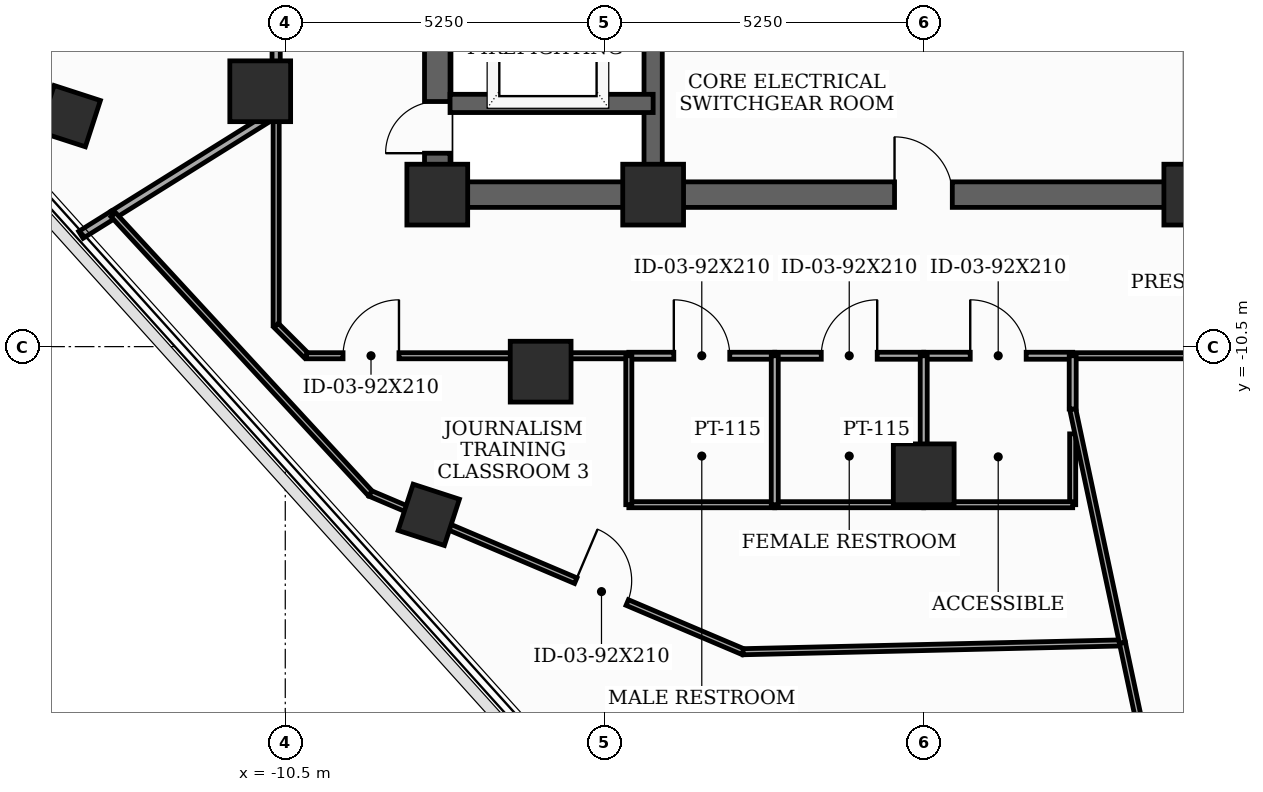
"""IFC4 building model, lengths in metres.
Left out: names, types, materials, properties, quantities, classifications, styles, units other than length and angle.
Written with IfcOpenShell. Run it as: python <this file> out.ifc"""

import sys

from ifc_helpers import new_model, si_unit, direction, frame, frame_2d, origin, origin_2d, place, context, subcontext, project, spatial, rectangle, extrude, element, fill, save


model = new_model("IFC4")
c1 = context("Model", 3, precision=1e-05, world=origin(), true_north=direction((0.0, 1.0)))
c2 = subcontext(c1, "Body", "Model", "MODEL_VIEW")
j1 = project(units=[si_unit("LENGTHUNIT", "METRE"), si_unit("PLANEANGLEUNIT", "RADIAN")], contexts=[c1])
p1 = place(None, origin())
s1 = spatial("IfcSite", under=j1, at=p1, CompositionType="ELEMENT")
p2 = place(p1, origin())
s2 = spatial("IfcBuilding", under=s1, at=p2, CompositionType="ELEMENT")
p3 = place(p2, frame((0.0, 0.0, 283.2)))
s3 = spatial("IfcBuildingStorey", under=s2, at=p3, CompositionType="ELEMENT", Elevation=283.2)
for number, where, z_axis, x_axis in (
    (1, (-8.0, -8.0, 0.0), (0.0, 0.0, 1.0), (1.0, 0.0, 0.0)),
    (2, (-4.45, -8.0, 0.0), (0.0, 0.0, 1.0), (1.0, 0.0, 0.0)),
    (3, (4.45, -8.0, 0.0), (0.0, 0.0, 1.0), (1.0, 0.0, 0.0)),
    (4, (-10.912, -6.3, 0.0), (0.0, 0.0, 1.0), (1.0, 0.0, 0.0)),
    (5, (-6.3, -10.912, 0.0), (0.0, 0.0, 1.0), (1.0, 0.0, 0.0)),
    (6, (0.0, -12.6, 0.0), (0.0, 0.0, 1.0), (1.0, 0.0, 0.0)),
):
    element("IfcColumn", number, at=place(p3, frame(where, z_axis=z_axis, x_axis=x_axis)), inside=s3, PredefinedType="COLUMN", context=c2, shape_type="SweptSolid", body=[
        extrude(rectangle(XDim=1.0, YDim=1.0, at=origin_2d()), origin(), (0.0, 0.0, 1.0), 3.7),
    ])
for number, where, z_axis, x_axis in (
    (7, (-14.045, -6.709, 0.0), (0.0, 0.0, 1.0), (0.309, 0.951, 0.0)),
    (8, (-8.14, -13.266, 0.0), (0.0, 0.0, 1.0), (0.309, 0.951, 0.0)),
):
    element("IfcColumn", number, at=place(p3, frame(where, z_axis=z_axis, x_axis=x_axis)), inside=s3, PredefinedType="COLUMN", context=c2, shape_type="SweptSolid", body=[
        extrude(rectangle(XDim=0.8, YDim=0.8, at=origin_2d()), origin(), (0.0, 0.0, 1.0), 3.7),
    ])
p4 = place(p3, frame((-8.0, -8.0, 0.0), z_axis=(0.0, 0.0, 1.0), x_axis=(0.0, 1.0, 0.0)))
e9 = element("IfcWall", 9, at=p4, inside=s3, PredefinedType="SHEAR", context=c2, shape_type="SweptSolid", body=[
    extrude(rectangle(XDim=16.0, YDim=0.42, at=frame_2d((8.0, 0.0))), origin(), (0.0, 0.0, 1.0), 3.5),
])
p5 = place(p4, frame((0.681, 0.0, 0.0)))
e10 = element("IfcOpeningElement", 10, at=p5, cuts=e9, PredefinedType="OPENING", context=c2, shape_type="SweptSolid", body=[
    extrude(rectangle(XDim=0.85, YDim=2.02, at=frame_2d((0.425, 1.01))), frame((0.0, 0.22, 0.0), z_axis=(0.0, -1.0, 0.0), x_axis=(1.0, 0.0, 0.0)), (0.0, 0.0, 1.0), 0.44),
])
p6 = place(p4, frame((5.35, 0.0, 0.0)))
e11 = element("IfcOpeningElement", 11, at=p6, cuts=e9, PredefinedType="OPENING", context=c2, shape_type="SweptSolid", body=[
    extrude(rectangle(XDim=1.05, YDim=2.15, at=frame_2d((0.525, 1.075))), frame((0.0, 0.22, 0.0), z_axis=(0.0, -1.0, 0.0), x_axis=(1.0, 0.0, 0.0)), (0.0, 0.0, 1.0), 0.44),
])
p7 = place(p3, frame((-8.0, -8.0, 0.0), z_axis=(0.0, 0.0, 1.0), x_axis=(1.0, 0.0, 0.0)))
e12 = element("IfcWall", 12, at=p7, inside=s3, PredefinedType="SHEAR", context=c2, shape_type="SweptSolid", body=[
    extrude(rectangle(XDim=16.0, YDim=0.42, at=frame_2d((8.0, 0.0))), origin(), (0.0, 0.0, 1.0), 3.5),
])
p8 = place(p7, frame((7.52, 0.0, 0.0)))
e13 = element("IfcOpeningElement", 13, at=p8, cuts=e12, PredefinedType="OPENING", context=c2, shape_type="SweptSolid", body=[
    extrude(rectangle(XDim=0.95, YDim=2.1, at=frame_2d((0.475, 1.05))), frame((0.0, 0.22, 0.0), z_axis=(0.0, -1.0, 0.0), x_axis=(1.0, 0.0, 0.0)), (0.0, 0.0, 1.0), 0.44),
])
p9 = place(p3, frame((-4.45, -7.79, 0.0), z_axis=(0.0, 0.0, 1.0), x_axis=(0.0, 1.0, 0.0)))
e14 = element("IfcWall", 14, at=p9, inside=s3, PredefinedType="SHEAR", context=c2, shape_type="SweptSolid", body=[
    extrude(rectangle(XDim=15.58, YDim=0.3, at=frame_2d((7.79, 0.0))), origin(), (0.0, 0.0, 1.0), 3.5),
])
p10 = place(p3, frame((-7.79, -6.5, 0.0), z_axis=(0.0, 0.0, 1.0), x_axis=(1.0, 0.0, 0.0)))
e15 = element("IfcWall", 15, at=p10, inside=s3, PredefinedType="SHEAR", context=c2, shape_type="SweptSolid", body=[
    extrude(rectangle(XDim=3.34, YDim=0.3, at=frame_2d((1.67, 0.0))), origin(), (0.0, 0.0, 1.0), 3.5),
])
p11 = place(p3, frame((-10.65, -4.225, 0.0), z_axis=(0.0, 0.0, 1.0), x_axis=(0.0, -1.0, 0.0)))
e16 = element("IfcWall", 16, at=p11, inside=s3, PredefinedType="PARTITIONING", context=c2, shape_type="SweptSolid", body=[
    extrude(rectangle(XDim=2.43, YDim=0.135, at=frame_2d((1.215, 0.0))), origin(), (0.0, 0.0, 1.0), 2.885),
])
p12 = place(p3, frame((-10.65, -6.655, 0.0), z_axis=(0.0, 0.0, 1.0), x_axis=(0.0, -1.0, 0.0)))
e17 = element("IfcWall", 17, at=p12, inside=s3, PredefinedType="MOVABLE", context=c2, shape_type="SweptSolid", body=[
    extrude(rectangle(XDim=3.495, YDim=0.1, at=frame_2d((1.748, 0.0))), origin(), (0.0, 0.0, 1.0), 2.885),
])
p13 = place(p3, frame((-10.65, -10.15, 0.0), z_axis=(0.0, 0.0, 1.0), x_axis=(0.707106781187, -0.707106781187, 0.0)))
e18 = element("IfcWall", 18, at=p13, inside=s3, PredefinedType="MOVABLE", context=c2, shape_type="SweptSolid", body=[
    extrude(rectangle(XDim=0.707, YDim=0.1, at=frame_2d((0.354, 0.0))), origin(), (0.0, 0.0, 1.0), 3.035),
])
p14 = place(p3, frame((-10.15, -10.65, 0.0), z_axis=(0.0, 0.0, 1.0), x_axis=(1.0, 0.0, 0.0)))
e19 = element("IfcWall", 19, at=p14, inside=s3, PredefinedType="MOVABLE", context=c2, shape_type="SweptSolid", body=[
    extrude(rectangle(XDim=5.3, YDim=0.1, at=frame_2d((2.65, 0.0))), origin(), (0.0, 0.0, 1.0), 2.885),
])
p15 = place(p14, frame((0.6, 0.0, 0.0)))
e20 = element("IfcOpeningElement", 20, at=p15, cuts=e19, PredefinedType="OPENING", context=c2, shape_type="SweptSolid", body=[
    extrude(rectangle(XDim=0.92, YDim=2.1, at=frame_2d((0.46, 1.05))), frame((0.0, 0.06, 0.0), z_axis=(0.0, -1.0, 0.0), x_axis=(1.0, 0.0, 0.0)), (0.0, 0.0, 1.0), 0.12),
])
p16 = place(p3, frame((-4.85, -10.65, 0.0), z_axis=(0.0, 0.0, 1.0), x_axis=(1.0, 0.0, 0.0)))
e21 = element("IfcWall", 21, at=p16, inside=s3, PredefinedType="PARTITIONING", context=c2, shape_type="SweptSolid", body=[
    extrude(rectangle(XDim=2.4, YDim=0.115, at=frame_2d((1.2, 0.0))), origin(), (0.0, 0.0, 1.0), 3.5),
])
p17 = place(p16, frame((0.74, 0.0, 0.0)))
e22 = element("IfcOpeningElement", 22, at=p17, cuts=e21, PredefinedType="OPENING", context=c2, shape_type="SweptSolid", body=[
    extrude(rectangle(XDim=0.92, YDim=2.1, at=frame_2d((0.46, 1.05))), frame((0.0, 0.067, 0.0), z_axis=(0.0, -1.0, 0.0), x_axis=(1.0, 0.0, 0.0)), (0.0, 0.0, 1.0), 0.135),
])
p18 = place(p3, frame((-2.45, -10.65, 0.0), z_axis=(0.0, 0.0, 1.0), x_axis=(1.0, 0.0, 0.0)))
e23 = element("IfcWall", 23, at=p18, inside=s3, PredefinedType="PARTITIONING", context=c2, shape_type="SweptSolid", body=[
    extrude(rectangle(XDim=2.45, YDim=0.115, at=frame_2d((1.225, 0.0))), origin(), (0.0, 0.0, 1.0), 2.885),
])
p19 = place(p18, frame((0.765, 0.0, 0.0)))
e24 = element("IfcOpeningElement", 24, at=p19, cuts=e23, PredefinedType="OPENING", context=c2, shape_type="SweptSolid", body=[
    extrude(rectangle(XDim=0.92, YDim=2.1, at=frame_2d((0.46, 1.05))), frame((0.0, 0.067, 0.0), z_axis=(0.0, -1.0, 0.0), x_axis=(1.0, 0.0, 0.0)), (0.0, 0.0, 1.0), 0.135),
])
p20 = place(p3, frame((0.0, -10.65, 0.0), z_axis=(0.0, 0.0, 1.0), x_axis=(1.0, 0.0, 0.0)))
e25 = element("IfcWall", 25, at=p20, inside=s3, PredefinedType="PARTITIONING", context=c2, shape_type="SweptSolid", body=[
    extrude(rectangle(XDim=2.45, YDim=0.115, at=frame_2d((1.225, 0.0))), origin(), (0.0, 0.0, 1.0), 3.5),
])
p21 = place(p20, frame((0.765, 0.0, 0.0)))
e26 = element("IfcOpeningElement", 26, at=p21, cuts=e25, PredefinedType="OPENING", context=c2, shape_type="SweptSolid", body=[
    extrude(rectangle(XDim=0.92, YDim=2.1, at=frame_2d((0.46, 1.05))), frame((0.0, 0.067, 0.0), z_axis=(0.0, -1.0, 0.0), x_axis=(1.0, 0.0, 0.0)), (0.0, 0.0, 1.0), 0.135),
])
p22 = place(p3, frame((2.45, -10.65, 0.0), z_axis=(0.0, 0.0, 1.0), x_axis=(1.0, 0.0, 0.0)))
e27 = element("IfcWall", 27, at=p22, inside=s3, PredefinedType="MOVABLE", context=c2, shape_type="SweptSolid", body=[
    extrude(rectangle(XDim=7.139, YDim=0.1, at=frame_2d((3.57, 0.0))), origin(), (0.0, 0.0, 1.0), 2.885),
])
p23 = place(p3, frame((-13.329, -8.329, 0.0), z_axis=(0.0, 0.0, 1.0), x_axis=(0.848059079617, 0.529901686617, 0.0)))
e28 = element("IfcWall", 28, at=p23, inside=s3, PredefinedType="PARTITIONING", context=c2, shape_type="SweptSolid", body=[
    extrude(rectangle(XDim=3.159, YDim=0.135, at=frame_2d((1.58, 0.0))), origin(), (0.0, 0.0, 1.0), 2.885),
])
p24 = place(p3, frame((-13.861, -8.661, 0.0), z_axis=(0.0, 0.0, 1.0), x_axis=(0.848151340075, 0.529754003599, 0.0)))
e29 = element("IfcWall", 29, at=p24, inside=s3, PredefinedType="PARTITIONING", context=c2, shape_type="SweptSolid", body=[
    extrude(rectangle(XDim=0.627, YDim=0.135, at=frame_2d((0.313, 0.0))), origin(), (0.0, 0.0, 1.0), 3.5),
])
p25 = place(p3, frame((-2.45, -13.1, 0.0), z_axis=(0.0, 0.0, 1.0), x_axis=(-1.0, 0.0, 0.0)))
e30 = element("IfcWall", 30, at=p25, inside=s3, PredefinedType="MOVABLE", context=c2, shape_type="SweptSolid", body=[
    extrude(rectangle(XDim=2.4, YDim=0.1, at=frame_2d((1.2, 0.0))), origin(), (0.0, 0.0, 1.0), 3.5),
])
p26 = place(p3, frame((-4.85, -13.1, 0.0), z_axis=(0.0, 0.0, 1.0), x_axis=(0.0, 1.0, 0.0)))
e31 = element("IfcWall", 31, at=p26, inside=s3, PredefinedType="MOVABLE", context=c2, shape_type="SweptSolid", body=[
    extrude(rectangle(XDim=2.45, YDim=0.1, at=frame_2d((1.225, 0.0))), origin(), (0.0, 0.0, 1.0), 2.885),
])
p27 = place(p3, frame((0.0, -13.1, 0.0), z_axis=(0.0, 0.0, 1.0), x_axis=(-1.0, 0.0, 0.0)))
e32 = element("IfcWall", 32, at=p27, inside=s3, PredefinedType="MOVABLE", context=c2, shape_type="SweptSolid", body=[
    extrude(rectangle(XDim=2.45, YDim=0.1, at=frame_2d((1.225, 0.0))), origin(), (0.0, 0.0, 1.0), 3.035),
])
p28 = place(p3, frame((-13.329, -8.329, 0.0), z_axis=(0.0, 0.0, 1.0), x_axis=(0.677841155448, -0.735208384052, 0.0)))
e33 = element("IfcWall", 33, at=p28, inside=s3, PredefinedType="MOVABLE", context=c2, shape_type="SweptSolid", body=[
    extrude(rectangle(XDim=6.239, YDim=0.1, at=frame_2d((3.12, 0.0))), origin(), (0.0, 0.0, 1.0), 3.5),
])
p29 = place(p3, frame((-9.1, -12.916, 0.0), z_axis=(0.0, 0.0, 1.0), x_axis=(0.920506675175, -0.390726836752, 0.0)))
e34 = element("IfcWall", 34, at=p29, inside=s3, PredefinedType="MOVABLE", context=c2, shape_type="SweptSolid", body=[
    extrude(rectangle(XDim=6.659, YDim=0.1, at=frame_2d((3.33, 0.0))), origin(), (0.0, 0.0, 1.0), 3.035),
])
p30 = place(p29, frame((3.669, 0.0, 0.0)))
e35 = element("IfcOpeningElement", 35, at=p30, cuts=e34, PredefinedType="OPENING", context=c2, shape_type="SweptSolid", body=[
    extrude(rectangle(XDim=0.92, YDim=2.1, at=frame_2d((0.46, 1.05))), frame((0.0, 0.06, 0.0), z_axis=(0.0, -1.0, 0.0), x_axis=(1.0, 0.0, 0.0)), (0.0, 0.0, 1.0), 0.12),
])
p31 = place(p3, frame((-2.97, -15.518, 0.0), z_axis=(0.0, 0.0, 1.0), x_axis=(0.99972988351, 0.023241342836, 0.0)))
e36 = element("IfcWall", 36, at=p31, inside=s3, PredefinedType="MOVABLE", context=c2, shape_type="SweptSolid", body=[
    extrude(rectangle(XDim=6.24, YDim=0.1, at=frame_2d((3.12, 0.0))), origin(), (0.0, 0.0, 1.0), 3.035),
])
p32 = place(p3, frame((2.45, -11.935, 0.0), z_axis=(0.0, 0.0, 1.0), x_axis=(0.0, -1.0, 0.0)))
e37 = element("IfcWall", 37, at=p32, inside=s3, PredefinedType="MOVABLE", context=c2, shape_type="SweptSolid", body=[
    extrude(rectangle(XDim=1.166, YDim=0.1, at=frame_2d((0.583, 0.0))), origin(), (0.0, 0.0, 1.0), 2.885),
])
p33 = place(p3, frame((2.45, -13.1, 0.0), z_axis=(0.0, 0.0, 1.0), x_axis=(-1.0, 0.0, 0.0)))
e38 = element("IfcWall", 38, at=p33, inside=s3, PredefinedType="MOVABLE", context=c2, shape_type="SweptSolid", body=[
    extrude(rectangle(XDim=2.45, YDim=0.1, at=frame_2d((1.225, 0.0))), origin(), (0.0, 0.0, 1.0), 3.035),
])
p34 = place(p3, frame((3.268, -15.373, 0.0), z_axis=(0.0, 0.0, 1.0), x_axis=(-0.208002774368, 0.978128235895, 0.0)))
e39 = element("IfcWall", 39, at=p34, inside=s3, PredefinedType="MOVABLE", context=c2, shape_type="SweptSolid", body=[
    extrude(rectangle(XDim=3.933, YDim=0.1, at=frame_2d((1.967, 0.0))), origin(), (0.0, 0.0, 1.0), 2.885),
])
for number, where, z_axis, x_axis in (
    (40, (-2.45, -13.1, 0.0), (0.0, 0.0, 1.0), (0.0, 1.0, 0.0)),
    (41, (0.0, -13.1, 0.0), (0.0, 0.0, 1.0), (0.0, 1.0, 0.0)),
):
    element("IfcWall", number, at=place(p3, frame(where, z_axis=z_axis, x_axis=x_axis)), inside=s3, PredefinedType="PARTITIONING", context=c2, shape_type="SweptSolid", body=[
        extrude(rectangle(XDim=2.45, YDim=0.115, at=frame_2d((1.225, 0.0))), origin(), (0.0, 0.0, 1.0), 2.885),
    ])
p35 = place(p3, frame((5.994, -28.2, 0.0), z_axis=(0.0, 0.0, 1.0), x_axis=(-0.20785296635, 0.978160081162, 0.0)))
e42 = element("IfcWall", 42, at=p35, inside=s3, PredefinedType="MOVABLE", context=c2, shape_type="SweptSolid", body=[
    extrude(rectangle(XDim=13.113, YDim=0.1, at=frame_2d((6.557, 0.0))), origin(), (0.0, 0.0, 1.0), 3.035),
])
p36 = place(p3, frame((2.45, -11.526, 0.0), z_axis=(0.0, 0.0, 1.0), x_axis=(0.0, 1.0, 0.0)))
e43 = element("IfcWall", 43, at=p36, inside=s3, PredefinedType="PARTITIONING", context=c2, shape_type="SweptSolid", body=[
    extrude(rectangle(XDim=0.876, YDim=0.115, at=frame_2d((0.438, 0.0))), origin(), (0.0, 0.0, 1.0), 3.5),
])
p37 = place(p5, origin())
e44 = element("IfcDoor", 44, at=p37, inside=s3, OperationType="SINGLE_SWING_LEFT", PredefinedType="TRAPDOOR", context=c2, shape_type="SweptSolid", body=[
    extrude(rectangle(XDim=0.85, YDim=2.02, at=frame_2d((0.425, 1.01))), frame((0.0, 0.025, 0.0), z_axis=(0.0, -1.0, 0.0), x_axis=(1.0, 0.0, 0.0)), (0.0, 0.0, 1.0), 0.05),
])
fill(e10, e44)
p38 = place(p8, origin())
e45 = element("IfcDoor", 45, at=p38, inside=s3, OperationType="SINGLE_SWING_LEFT", PredefinedType="DOOR", context=c2, shape_type="SweptSolid", body=[
    extrude(rectangle(XDim=0.95, YDim=2.1, at=frame_2d((0.475, 1.05))), frame((0.0, 0.025, 0.0), z_axis=(0.0, -1.0, 0.0), x_axis=(1.0, 0.0, 0.0)), (0.0, 0.0, 1.0), 0.05),
])
fill(e13, e45)
p39 = place(p15, origin())
e46 = element("IfcDoor", 46, at=p39, inside=s3, OperationType="SINGLE_SWING_RIGHT", PredefinedType="DOOR", context=c2, shape_type="SweptSolid", body=[
    extrude(rectangle(XDim=0.92, YDim=2.1, at=frame_2d((0.46, 1.05))), frame((0.0, 0.025, 0.0), z_axis=(0.0, -1.0, 0.0), x_axis=(1.0, 0.0, 0.0)), (0.0, 0.0, 1.0), 0.05),
])
fill(e20, e46)
p40 = place(p17, origin())
e47 = element("IfcDoor", 47, at=p40, inside=s3, OperationType="SINGLE_SWING_LEFT", PredefinedType="DOOR", context=c2, shape_type="SweptSolid", body=[
    extrude(rectangle(XDim=0.92, YDim=2.1, at=frame_2d((0.46, 1.05))), frame((0.0, 0.025, 0.0), z_axis=(0.0, -1.0, 0.0), x_axis=(1.0, 0.0, 0.0)), (0.0, 0.0, 1.0), 0.05),
])
fill(e22, e47)
p41 = place(p19, origin())
e48 = element("IfcDoor", 48, at=p41, inside=s3, OperationType="SINGLE_SWING_RIGHT", PredefinedType="DOOR", context=c2, shape_type="SweptSolid", body=[
    extrude(rectangle(XDim=0.92, YDim=2.1, at=frame_2d((0.46, 1.05))), frame((0.0, 0.025, 0.0), z_axis=(0.0, -1.0, 0.0), x_axis=(1.0, 0.0, 0.0)), (0.0, 0.0, 1.0), 0.05),
])
fill(e24, e48)
p42 = place(p21, origin())
e49 = element("IfcDoor", 49, at=p42, inside=s3, OperationType="SINGLE_SWING_LEFT", PredefinedType="DOOR", context=c2, shape_type="SweptSolid", body=[
    extrude(rectangle(XDim=0.92, YDim=2.1, at=frame_2d((0.46, 1.05))), frame((0.0, 0.025, 0.0), z_axis=(0.0, -1.0, 0.0), x_axis=(1.0, 0.0, 0.0)), (0.0, 0.0, 1.0), 0.05),
])
fill(e26, e49)
p43 = place(p30, origin())
e50 = element("IfcDoor", 50, at=p43, inside=s3, OperationType="SINGLE_SWING_LEFT", PredefinedType="DOOR", context=c2, shape_type="SweptSolid", body=[
    extrude(rectangle(XDim=0.92, YDim=2.1, at=frame_2d((0.46, 1.05))), frame((0.0, 0.025, 0.0), z_axis=(0.0, -1.0, 0.0), x_axis=(1.0, 0.0, 0.0)), (0.0, 0.0, 1.0), 0.05),
])
fill(e35, e50)
save(model, sys.argv[1])
